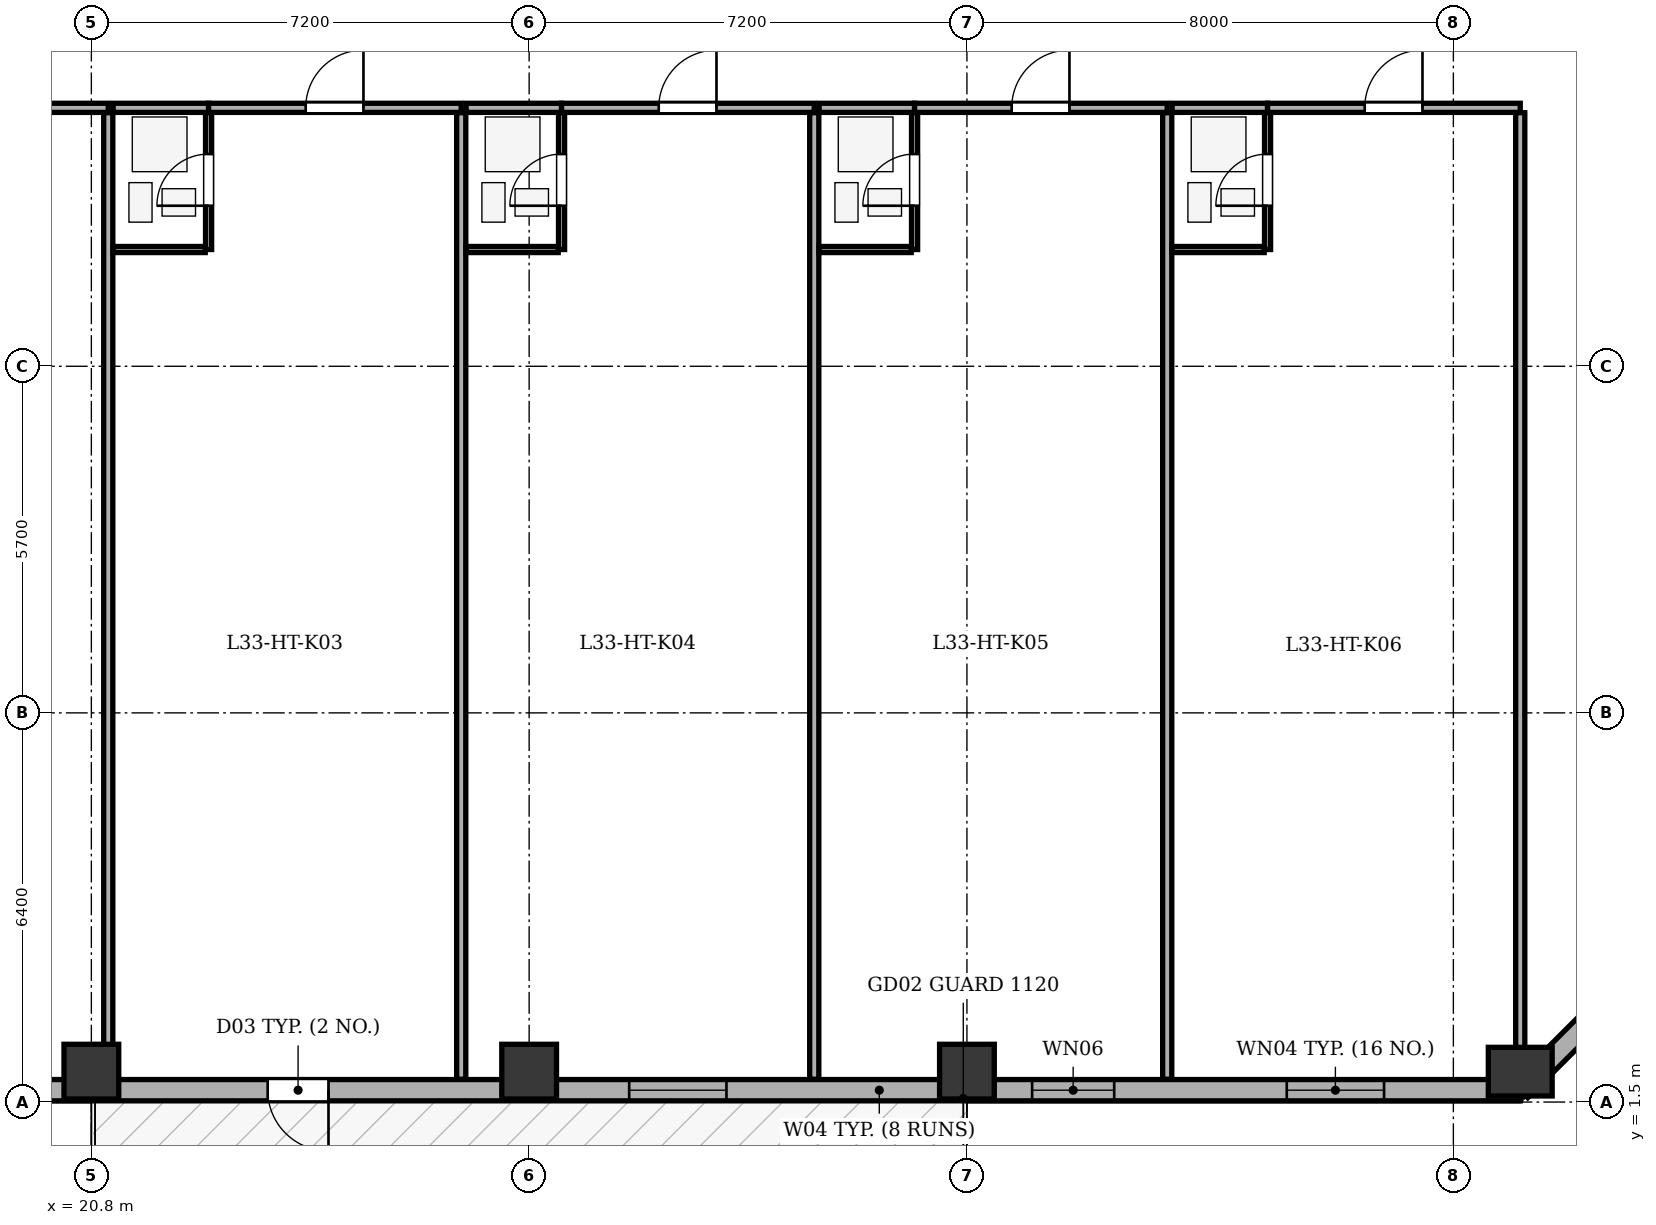
"""IFC4 building model, lengths in metres.
Left out: names, types, materials, properties, quantities, classifications, styles, units other than length and angle.
Written with IfcOpenShell. Run it as: python <this file> out.ifc"""

import sys

from ifc_helpers import new_model, si_unit, direction, frame, frame_2d, origin, origin_2d, place, context, subcontext, project, spatial, rectangle, extrude, element, fill, save


model = new_model("IFC4")
c1 = context("Model", 3, precision=1e-05, world=origin(), true_north=direction((0.0, 1.0)))
c2 = subcontext(c1, "Body", "Model", "MODEL_VIEW")
j1 = project(units=[si_unit("LENGTHUNIT", "METRE"), si_unit("PLANEANGLEUNIT", "RADIAN")], contexts=[c1])
p1 = place(None, origin())
s1 = spatial("IfcSite", under=j1, at=p1, CompositionType="ELEMENT")
p2 = place(p1, origin())
s2 = spatial("IfcBuilding", under=s1, at=p2, CompositionType="ELEMENT")
p3 = place(p2, frame((0.0, 0.0, 134.3)))
s3 = spatial("IfcBuildingStorey", under=s2, at=p3, CompositionType="ELEMENT", Elevation=134.3)
for number, where, z_axis, x_axis in (
    (1, (20.8, 2.0, 0.0), (0.0, 0.0, 1.0), (1.0, 0.0, 0.0)),
    (2, (28.0, 2.0, 0.0), (0.0, 0.0, 1.0), (1.0, 0.0, 0.0)),
    (3, (35.2, 2.0, 0.0), (0.0, 0.0, 1.0), (1.0, 0.0, 0.0)),
):
    element("IfcColumn", number, at=place(p3, frame(where, z_axis=z_axis, x_axis=x_axis)), inside=s3, PredefinedType="COLUMN", context=c2, shape_type="SweptSolid", body=[
        extrude(rectangle(XDim=0.9, YDim=0.9, at=origin_2d()), origin(), (0.0, 0.0, 1.0), 3.5),
    ])
p4 = place(p3, frame((44.3, 2.0, 0.0), z_axis=(0.0, 0.0, 1.0), x_axis=(1.0, 0.0, 0.0)))
e4 = element("IfcColumn", 4, at=p4, inside=s3, PredefinedType="COLUMN", context=c2, shape_type="SweptSolid", body=[
    extrude(rectangle(XDim=0.8, YDim=1.05, at=origin_2d()), origin(), (0.0, 0.0, 1.0), 3.5),
])
p5 = place(p3, frame((44.3, 1.695, 0.0), z_axis=(0.0, 0.0, 1.0), x_axis=(-1.0, 0.0, 0.0)))
e5 = element("IfcWall", 5, at=p5, inside=s3, PredefinedType="STANDARD", context=c2, shape_type="SweptSolid", body=[
    extrude(rectangle(XDim=35.0, YDim=0.35, at=frame_2d((17.5, 0.0))), origin(), (0.0, 0.0, 1.0), 2.785),
])
p6 = place(p5, frame((19.6, 0.0, 0.0)))
e6 = element("IfcOpeningElement", 6, at=p6, cuts=e5, PredefinedType="OPENING", context=c2, shape_type="SweptSolid", body=[
    extrude(rectangle(XDim=1.0, YDim=2.02, at=frame_2d((0.5, 1.01))), frame((0.0, 0.185, 0.0), z_axis=(0.0, -1.0, 0.0), x_axis=(1.0, 0.0, 0.0)), (0.0, 0.0, 1.0), 0.37),
])
p7 = place(p5, frame((2.24, 0.0, 0.75)))
e7 = element("IfcOpeningElement", 7, at=p7, cuts=e5, PredefinedType="OPENING", context=c2, shape_type="SweptSolid", body=[
    extrude(rectangle(XDim=1.6, YDim=1.75, at=frame_2d((0.8, 0.875))), frame((0.0, 0.185, 0.0), z_axis=(0.0, -1.0, 0.0), x_axis=(1.0, 0.0, 0.0)), (0.0, 0.0, 1.0), 0.37),
])
p8 = place(p5, frame((6.678, 0.0, 0.75)))
e8 = element("IfcOpeningElement", 8, at=p8, cuts=e5, PredefinedType="OPENING", context=c2, shape_type="SweptSolid", body=[
    extrude(rectangle(XDim=1.35, YDim=1.75, at=frame_2d((0.675, 0.875))), frame((0.0, 0.185, 0.0), z_axis=(0.0, -1.0, 0.0), x_axis=(1.0, 0.0, 0.0)), (0.0, 0.0, 1.0), 0.37),
])
p9 = place(p5, frame((13.055, 0.0, 0.75)))
e9 = element("IfcOpeningElement", 9, at=p9, cuts=e5, PredefinedType="OPENING", context=c2, shape_type="SweptSolid", body=[
    extrude(rectangle(XDim=1.6, YDim=1.75, at=frame_2d((0.8, 0.875))), frame((0.0, 0.185, 0.0), z_axis=(0.0, -1.0, 0.0), x_axis=(1.0, 0.0, 0.0)), (0.0, 0.0, 1.0), 0.37),
])
p10 = place(p5, frame((25.393, 0.0, 0.75)))
e10 = element("IfcOpeningElement", 10, at=p10, cuts=e5, PredefinedType="OPENING", context=c2, shape_type="SweptSolid", body=[
    extrude(rectangle(XDim=1.6, YDim=1.75, at=frame_2d((0.8, 0.875))), frame((0.0, 0.185, 0.0), z_axis=(0.0, -1.0, 0.0), x_axis=(1.0, 0.0, 0.0)), (0.0, 0.0, 1.0), 0.37),
])
p11 = place(p5, frame((30.618, 0.0, 0.75)))
e11 = element("IfcOpeningElement", 11, at=p11, cuts=e5, PredefinedType="OPENING", context=c2, shape_type="SweptSolid", body=[
    extrude(rectangle(XDim=1.6, YDim=1.75, at=frame_2d((0.8, 0.875))), frame((0.0, 0.185, 0.0), z_axis=(0.0, -1.0, 0.0), x_axis=(1.0, 0.0, 0.0)), (0.0, 0.0, 1.0), 0.37),
])
p12 = place(p3, frame((49.105, 6.5, 0.0), z_axis=(0.0, 0.0, 1.0), x_axis=(-0.707106781187, -0.707106781187, 0.0)))
e12 = element("IfcWall", 12, at=p12, inside=s3, PredefinedType="STANDARD", context=c2, shape_type="SweptSolid", body=[
    extrude(rectangle(XDim=6.795, YDim=0.35, at=frame_2d((3.397, 0.0))), origin(), (0.0, 0.0, 1.0), 2.785),
])
p13 = place(p12, frame((2.698, 0.0, 0.75)))
e13 = element("IfcOpeningElement", 13, at=p13, cuts=e12, PredefinedType="OPENING", context=c2, shape_type="SweptSolid", body=[
    extrude(rectangle(XDim=1.4, YDim=1.65, at=frame_2d((0.7, 0.825))), frame((0.0, 0.185, 0.0), z_axis=(0.0, -1.0, 0.0), x_axis=(1.0, 0.0, 0.0)), (0.0, 0.0, 1.0), 0.37),
])
p14 = place(p3, frame((17.264, 17.85, 0.0), z_axis=(0.0, 0.0, 1.0), x_axis=(1.0, 0.0, 0.0)))
e14 = element("IfcWall", 14, at=p14, inside=s3, PredefinedType="PARTITIONING", context=c2, shape_type="SweptSolid", body=[
    extrude(rectangle(XDim=3.814, YDim=0.15, at=frame_2d((1.907, 0.0))), origin(), (0.0, 0.0, 1.0), 3.2),
])
p15 = place(p14, frame((1.427, 0.0, 0.0)))
e15 = element("IfcOpeningElement", 15, at=p15, cuts=e14, PredefinedType="OPENING", context=c2, shape_type="SweptSolid", body=[
    extrude(rectangle(XDim=0.95, YDim=2.1, at=frame_2d((0.475, 1.05))), frame((0.0, 0.085, 0.0), z_axis=(0.0, -1.0, 0.0), x_axis=(1.0, 0.0, 0.0)), (0.0, 0.0, 1.0), 0.17),
])
p16 = place(p3, frame((21.078, 1.875, 0.0), z_axis=(0.0, 0.0, 1.0), x_axis=(0.0, 1.0, 0.0)))
e16 = element("IfcWall", 16, at=p16, inside=s3, PredefinedType="PARTITIONING", context=c2, shape_type="SweptSolid", body=[
    extrude(rectangle(XDim=15.895, YDim=0.15, at=frame_2d((7.948, 0.0))), origin(), (0.0, 0.0, 1.0), 2.535),
])
p17 = place(p3, frame((21.158, 17.85, 0.0), z_axis=(0.0, 0.0, 1.0), x_axis=(1.0, 0.0, 0.0)))
e17 = element("IfcWall", 17, at=p17, inside=s3, PredefinedType="PARTITIONING", context=c2, shape_type="SweptSolid", body=[
    extrude(rectangle(XDim=1.57, YDim=0.15, at=frame_2d((0.785, 0.0))), origin(), (0.0, 0.0, 1.0), 3.2),
])
p18 = place(p3, frame((22.728, 17.85, 0.0), z_axis=(0.0, 0.0, 1.0), x_axis=(1.0, 0.0, 0.0)))
e18 = element("IfcWall", 18, at=p18, inside=s3, PredefinedType="PARTITIONING", context=c2, shape_type="SweptSolid", body=[
    extrude(rectangle(XDim=4.155, YDim=0.15, at=frame_2d((2.078, 0.0))), origin(), (0.0, 0.0, 1.0), 3.2),
])
p19 = place(p18, frame((1.597, 0.0, 0.0)))
e19 = element("IfcOpeningElement", 19, at=p19, cuts=e18, PredefinedType="OPENING", context=c2, shape_type="SweptSolid", body=[
    extrude(rectangle(XDim=0.95, YDim=2.1, at=frame_2d((0.475, 1.05))), frame((0.0, 0.085, 0.0), z_axis=(0.0, -1.0, 0.0), x_axis=(1.0, 0.0, 0.0)), (0.0, 0.0, 1.0), 0.17),
])
p20 = place(p3, frame((22.728, 15.52, 0.0), z_axis=(0.0, 0.0, 1.0), x_axis=(0.0, 1.0, 0.0)))
e20 = element("IfcWall", 20, at=p20, inside=s3, PredefinedType="PARTITIONING", context=c2, shape_type="SweptSolid", body=[
    extrude(rectangle(XDim=2.25, YDim=0.1, at=frame_2d((1.125, 0.0))), origin(), (0.0, 0.0, 1.0), 3.2),
])
p21 = place(p20, frame((0.72, 0.0, 0.0)))
e21 = element("IfcOpeningElement", 21, at=p21, cuts=e20, PredefinedType="OPENING", context=c2, shape_type="SweptSolid", body=[
    extrude(rectangle(XDim=0.85, YDim=2.05, at=frame_2d((0.425, 1.025))), frame((0.0, 0.06, 0.0), z_axis=(0.0, -1.0, 0.0), x_axis=(1.0, 0.0, 0.0)), (0.0, 0.0, 1.0), 0.12),
])
p22 = place(p3, frame((21.158, 15.52, 0.0), z_axis=(0.0, 0.0, 1.0), x_axis=(1.0, 0.0, 0.0)))
e22 = element("IfcWall", 22, at=p22, inside=s3, PredefinedType="PARTITIONING", context=c2, shape_type="SweptSolid", body=[
    extrude(rectangle(XDim=1.515, YDim=0.1, at=frame_2d((0.758, 0.0))), origin(), (0.0, 0.0, 1.0), 3.2),
])
p23 = place(p3, frame((26.883, 1.875, 0.0), z_axis=(0.0, 0.0, 1.0), x_axis=(0.0, 1.0, 0.0)))
e23 = element("IfcWall", 23, at=p23, inside=s3, PredefinedType="PARTITIONING", context=c2, shape_type="SweptSolid", body=[
    extrude(rectangle(XDim=15.895, YDim=0.15, at=frame_2d((7.948, 0.0))), origin(), (0.0, 0.0, 1.0), 3.2),
])
p24 = place(p3, frame((26.963, 17.85, 0.0), z_axis=(0.0, 0.0, 1.0), x_axis=(1.0, 0.0, 0.0)))
e24 = element("IfcWall", 24, at=p24, inside=s3, PredefinedType="PARTITIONING", context=c2, shape_type="SweptSolid", body=[
    extrude(rectangle(XDim=1.57, YDim=0.15, at=frame_2d((0.785, 0.0))), origin(), (0.0, 0.0, 1.0), 3.2),
])
p25 = place(p3, frame((28.533, 17.85, 0.0), z_axis=(0.0, 0.0, 1.0), x_axis=(1.0, 0.0, 0.0)))
e25 = element("IfcWall", 25, at=p25, inside=s3, PredefinedType="PARTITIONING", context=c2, shape_type="SweptSolid", body=[
    extrude(rectangle(XDim=4.156, YDim=0.15, at=frame_2d((2.078, 0.0))), origin(), (0.0, 0.0, 1.0), 3.2),
])
p26 = place(p25, frame((1.598, 0.0, 0.0)))
e26 = element("IfcOpeningElement", 26, at=p26, cuts=e25, PredefinedType="OPENING", context=c2, shape_type="SweptSolid", body=[
    extrude(rectangle(XDim=0.95, YDim=2.1, at=frame_2d((0.475, 1.05))), frame((0.0, 0.085, 0.0), z_axis=(0.0, -1.0, 0.0), x_axis=(1.0, 0.0, 0.0)), (0.0, 0.0, 1.0), 0.17),
])
p27 = place(p3, frame((28.533, 15.52, 0.0), z_axis=(0.0, 0.0, 1.0), x_axis=(0.0, 1.0, 0.0)))
e27 = element("IfcWall", 27, at=p27, inside=s3, PredefinedType="PARTITIONING", context=c2, shape_type="SweptSolid", body=[
    extrude(rectangle(XDim=2.25, YDim=0.1, at=frame_2d((1.125, 0.0))), origin(), (0.0, 0.0, 1.0), 3.2),
])
p28 = place(p27, frame((0.72, 0.0, 0.0)))
e28 = element("IfcOpeningElement", 28, at=p28, cuts=e27, PredefinedType="OPENING", context=c2, shape_type="SweptSolid", body=[
    extrude(rectangle(XDim=0.85, YDim=2.05, at=frame_2d((0.425, 1.025))), frame((0.0, 0.06, 0.0), z_axis=(0.0, -1.0, 0.0), x_axis=(1.0, 0.0, 0.0)), (0.0, 0.0, 1.0), 0.12),
])
p29 = place(p3, frame((26.963, 15.52, 0.0), z_axis=(0.0, 0.0, 1.0), x_axis=(1.0, 0.0, 0.0)))
e29 = element("IfcWall", 29, at=p29, inside=s3, PredefinedType="PARTITIONING", context=c2, shape_type="SweptSolid", body=[
    extrude(rectangle(XDim=1.515, YDim=0.1, at=frame_2d((0.758, 0.0))), origin(), (0.0, 0.0, 1.0), 3.2),
])
p30 = place(p3, frame((32.689, 1.875, 0.0), z_axis=(0.0, 0.0, 1.0), x_axis=(0.0, 1.0, 0.0)))
e30 = element("IfcWall", 30, at=p30, inside=s3, PredefinedType="PARTITIONING", context=c2, shape_type="SweptSolid", body=[
    extrude(rectangle(XDim=15.895, YDim=0.15, at=frame_2d((7.948, 0.0))), origin(), (0.0, 0.0, 1.0), 3.2),
])
p31 = place(p3, frame((32.769, 17.85, 0.0), z_axis=(0.0, 0.0, 1.0), x_axis=(1.0, 0.0, 0.0)))
e31 = element("IfcWall", 31, at=p31, inside=s3, PredefinedType="PARTITIONING", context=c2, shape_type="SweptSolid", body=[
    extrude(rectangle(XDim=1.57, YDim=0.15, at=frame_2d((0.785, 0.0))), origin(), (0.0, 0.0, 1.0), 3.2),
])
p32 = place(p3, frame((34.339, 17.85, 0.0), z_axis=(0.0, 0.0, 1.0), x_axis=(1.0, 0.0, 0.0)))
e32 = element("IfcWall", 32, at=p32, inside=s3, PredefinedType="PARTITIONING", context=c2, shape_type="SweptSolid", body=[
    extrude(rectangle(XDim=4.155, YDim=0.15, at=frame_2d((2.077, 0.0))), origin(), (0.0, 0.0, 1.0), 3.2),
])
p33 = place(p32, frame((1.597, 0.0, 0.0)))
e33 = element("IfcOpeningElement", 33, at=p33, cuts=e32, PredefinedType="OPENING", context=c2, shape_type="SweptSolid", body=[
    extrude(rectangle(XDim=0.95, YDim=2.1, at=frame_2d((0.475, 1.05))), frame((0.0, 0.085, 0.0), z_axis=(0.0, -1.0, 0.0), x_axis=(1.0, 0.0, 0.0)), (0.0, 0.0, 1.0), 0.17),
])
p34 = place(p3, frame((34.339, 15.52, 0.0), z_axis=(0.0, 0.0, 1.0), x_axis=(0.0, 1.0, 0.0)))
e34 = element("IfcWall", 34, at=p34, inside=s3, PredefinedType="PARTITIONING", context=c2, shape_type="SweptSolid", body=[
    extrude(rectangle(XDim=2.25, YDim=0.1, at=frame_2d((1.125, 0.0))), origin(), (0.0, 0.0, 1.0), 3.2),
])
p35 = place(p34, frame((0.72, 0.0, 0.0)))
e35 = element("IfcOpeningElement", 35, at=p35, cuts=e34, PredefinedType="OPENING", context=c2, shape_type="SweptSolid", body=[
    extrude(rectangle(XDim=0.85, YDim=2.05, at=frame_2d((0.425, 1.025))), frame((0.0, 0.06, 0.0), z_axis=(0.0, -1.0, 0.0), x_axis=(1.0, 0.0, 0.0)), (0.0, 0.0, 1.0), 0.12),
])
p36 = place(p3, frame((32.769, 15.52, 0.0), z_axis=(0.0, 0.0, 1.0), x_axis=(1.0, 0.0, 0.0)))
e36 = element("IfcWall", 36, at=p36, inside=s3, PredefinedType="PARTITIONING", context=c2, shape_type="SweptSolid", body=[
    extrude(rectangle(XDim=1.515, YDim=0.1, at=frame_2d((0.757, 0.0))), origin(), (0.0, 0.0, 1.0), 3.2),
])
p37 = place(p3, frame((38.494, 1.875, 0.0), z_axis=(0.0, 0.0, 1.0), x_axis=(0.0, 1.0, 0.0)))
e37 = element("IfcWall", 37, at=p37, inside=s3, PredefinedType="PARTITIONING", context=c2, shape_type="SweptSolid", body=[
    extrude(rectangle(XDim=15.895, YDim=0.15, at=frame_2d((7.948, 0.0))), origin(), (0.0, 0.0, 1.0), 3.2),
])
p38 = place(p3, frame((38.574, 17.85, 0.0), z_axis=(0.0, 0.0, 1.0), x_axis=(1.0, 0.0, 0.0)))
e38 = element("IfcWall", 38, at=p38, inside=s3, PredefinedType="PARTITIONING", context=c2, shape_type="SweptSolid", body=[
    extrude(rectangle(XDim=1.57, YDim=0.15, at=frame_2d((0.785, 0.0))), origin(), (0.0, 0.0, 1.0), 3.2),
])
p39 = place(p3, frame((40.144, 17.85, 0.0), z_axis=(0.0, 0.0, 1.0), x_axis=(1.0, 0.0, 0.0)))
e39 = element("IfcWall", 39, at=p39, inside=s3, PredefinedType="PARTITIONING", context=c2, shape_type="SweptSolid", body=[
    extrude(rectangle(XDim=4.156, YDim=0.15, at=frame_2d((2.078, 0.0))), origin(), (0.0, 0.0, 1.0), 3.2),
])
p40 = place(p39, frame((1.598, 0.0, 0.0)))
e40 = element("IfcOpeningElement", 40, at=p40, cuts=e39, PredefinedType="OPENING", context=c2, shape_type="SweptSolid", body=[
    extrude(rectangle(XDim=0.95, YDim=2.1, at=frame_2d((0.475, 1.05))), frame((0.0, 0.085, 0.0), z_axis=(0.0, -1.0, 0.0), x_axis=(1.0, 0.0, 0.0)), (0.0, 0.0, 1.0), 0.17),
])
p41 = place(p3, frame((40.144, 15.52, 0.0), z_axis=(0.0, 0.0, 1.0), x_axis=(0.0, 1.0, 0.0)))
e41 = element("IfcWall", 41, at=p41, inside=s3, PredefinedType="PARTITIONING", context=c2, shape_type="SweptSolid", body=[
    extrude(rectangle(XDim=2.25, YDim=0.1, at=frame_2d((1.125, 0.0))), origin(), (0.0, 0.0, 1.0), 3.2),
])
p42 = place(p41, frame((0.72, 0.0, 0.0)))
e42 = element("IfcOpeningElement", 42, at=p42, cuts=e41, PredefinedType="OPENING", context=c2, shape_type="SweptSolid", body=[
    extrude(rectangle(XDim=0.85, YDim=2.05, at=frame_2d((0.425, 1.025))), frame((0.0, 0.06, 0.0), z_axis=(0.0, -1.0, 0.0), x_axis=(1.0, 0.0, 0.0)), (0.0, 0.0, 1.0), 0.12),
])
p43 = place(p3, frame((38.574, 15.52, 0.0), z_axis=(0.0, 0.0, 1.0), x_axis=(1.0, 0.0, 0.0)))
e43 = element("IfcWall", 43, at=p43, inside=s3, PredefinedType="PARTITIONING", context=c2, shape_type="SweptSolid", body=[
    extrude(rectangle(XDim=1.515, YDim=0.1, at=frame_2d((0.758, 0.0))), origin(), (0.0, 0.0, 1.0), 3.2),
])
p44 = place(p3, frame((44.3, 1.875, 0.0), z_axis=(0.0, 0.0, 1.0), x_axis=(0.0, 1.0, 0.0)))
e44 = element("IfcWall", 44, at=p44, inside=s3, PredefinedType="PARTITIONING", context=c2, shape_type="SweptSolid", body=[
    extrude(rectangle(XDim=15.895, YDim=0.15, at=frame_2d((7.948, 0.0))), origin(), (0.0, 0.0, 1.0), 3.2),
])
p45 = place(p6, origin())
e45 = element("IfcDoor", 45, at=p45, inside=s3, OperationType="SINGLE_SWING_LEFT", PredefinedType="DOOR", context=c2, shape_type="SweptSolid", body=[
    extrude(rectangle(XDim=1.0, YDim=2.02, at=frame_2d((0.5, 1.01))), frame((0.0, 0.025, 0.0), z_axis=(0.0, -1.0, 0.0), x_axis=(1.0, 0.0, 0.0)), (0.0, 0.0, 1.0), 0.05),
])
fill(e6, e45)
p46 = place(p7, origin())
e46 = element("IfcWindow", 46, at=p46, inside=s3, PartitioningType="SINGLE_PANEL", PredefinedType="WINDOW", context=c2, shape_type="SweptSolid", body=[
    extrude(rectangle(XDim=1.6, YDim=1.75, at=frame_2d((0.8, 0.875))), frame((0.0, -0.01, 0.0), z_axis=(0.0, -1.0, 0.0), x_axis=(1.0, 0.0, 0.0)), (0.0, 0.0, 1.0), 0.06),
])
fill(e7, e46)
p47 = place(p8, origin())
e47 = element("IfcWindow", 47, at=p47, inside=s3, PartitioningType="SINGLE_PANEL", PredefinedType="WINDOW", context=c2, shape_type="SweptSolid", body=[
    extrude(rectangle(XDim=1.35, YDim=1.75, at=frame_2d((0.675, 0.875))), frame((0.0, -0.01, 0.0), z_axis=(0.0, -1.0, 0.0), x_axis=(1.0, 0.0, 0.0)), (0.0, 0.0, 1.0), 0.06),
])
fill(e8, e47)
p48 = place(p9, origin())
e48 = element("IfcWindow", 48, at=p48, inside=s3, PartitioningType="SINGLE_PANEL", PredefinedType="WINDOW", context=c2, shape_type="SweptSolid", body=[
    extrude(rectangle(XDim=1.6, YDim=1.75, at=frame_2d((0.8, 0.875))), frame((0.0, -0.01, 0.0), z_axis=(0.0, -1.0, 0.0), x_axis=(1.0, 0.0, 0.0)), (0.0, 0.0, 1.0), 0.06),
])
fill(e9, e48)
p49 = place(p21, origin())
e49 = element("IfcDoor", 49, at=p49, inside=s3, OperationType="SINGLE_SWING_LEFT", PredefinedType="DOOR", context=c2, shape_type="SweptSolid", body=[
    extrude(rectangle(XDim=0.85, YDim=2.05, at=frame_2d((0.425, 1.025))), frame((0.0, 0.025, 0.0), z_axis=(0.0, -1.0, 0.0), x_axis=(1.0, 0.0, 0.0)), (0.0, 0.0, 1.0), 0.05),
])
fill(e21, e49)
p50 = place(p19, origin())
e50 = element("IfcDoor", 50, at=p50, inside=s3, OperationType="SINGLE_SWING_RIGHT", PredefinedType="DOOR", context=c2, shape_type="SweptSolid", body=[
    extrude(rectangle(XDim=0.95, YDim=2.1, at=frame_2d((0.475, 1.05))), frame((0.0, 0.025, 0.0), z_axis=(0.0, -1.0, 0.0), x_axis=(1.0, 0.0, 0.0)), (0.0, 0.0, 1.0), 0.05),
])
fill(e19, e50)
p51 = place(p28, origin())
e51 = element("IfcDoor", 51, at=p51, inside=s3, OperationType="SINGLE_SWING_LEFT", PredefinedType="DOOR", context=c2, shape_type="SweptSolid", body=[
    extrude(rectangle(XDim=0.85, YDim=2.05, at=frame_2d((0.425, 1.025))), frame((0.0, 0.025, 0.0), z_axis=(0.0, -1.0, 0.0), x_axis=(1.0, 0.0, 0.0)), (0.0, 0.0, 1.0), 0.05),
])
fill(e28, e51)
p52 = place(p26, origin())
e52 = element("IfcDoor", 52, at=p52, inside=s3, OperationType="SINGLE_SWING_RIGHT", PredefinedType="DOOR", context=c2, shape_type="SweptSolid", body=[
    extrude(rectangle(XDim=0.95, YDim=2.1, at=frame_2d((0.475, 1.05))), frame((0.0, 0.025, 0.0), z_axis=(0.0, -1.0, 0.0), x_axis=(1.0, 0.0, 0.0)), (0.0, 0.0, 1.0), 0.05),
])
fill(e26, e52)
p53 = place(p35, origin())
e53 = element("IfcDoor", 53, at=p53, inside=s3, OperationType="SINGLE_SWING_LEFT", PredefinedType="DOOR", context=c2, shape_type="SweptSolid", body=[
    extrude(rectangle(XDim=0.85, YDim=2.05, at=frame_2d((0.425, 1.025))), frame((0.0, 0.025, 0.0), z_axis=(0.0, -1.0, 0.0), x_axis=(1.0, 0.0, 0.0)), (0.0, 0.0, 1.0), 0.05),
])
fill(e35, e53)
p54 = place(p33, origin())
e54 = element("IfcDoor", 54, at=p54, inside=s3, OperationType="SINGLE_SWING_RIGHT", PredefinedType="DOOR", context=c2, shape_type="SweptSolid", body=[
    extrude(rectangle(XDim=0.95, YDim=2.1, at=frame_2d((0.475, 1.05))), frame((0.0, 0.025, 0.0), z_axis=(0.0, -1.0, 0.0), x_axis=(1.0, 0.0, 0.0)), (0.0, 0.0, 1.0), 0.05),
])
fill(e33, e54)
p55 = place(p42, origin())
e55 = element("IfcDoor", 55, at=p55, inside=s3, OperationType="SINGLE_SWING_LEFT", PredefinedType="DOOR", context=c2, shape_type="SweptSolid", body=[
    extrude(rectangle(XDim=0.85, YDim=2.05, at=frame_2d((0.425, 1.025))), frame((0.0, 0.025, 0.0), z_axis=(0.0, -1.0, 0.0), x_axis=(1.0, 0.0, 0.0)), (0.0, 0.0, 1.0), 0.05),
])
fill(e42, e55)
p56 = place(p40, origin())
e56 = element("IfcDoor", 56, at=p56, inside=s3, OperationType="SINGLE_SWING_RIGHT", PredefinedType="DOOR", context=c2, shape_type="SweptSolid", body=[
    extrude(rectangle(XDim=0.95, YDim=2.1, at=frame_2d((0.475, 1.05))), frame((0.0, 0.025, 0.0), z_axis=(0.0, -1.0, 0.0), x_axis=(1.0, 0.0, 0.0)), (0.0, 0.0, 1.0), 0.05),
])
fill(e40, e56)
save(model, sys.argv[1])
